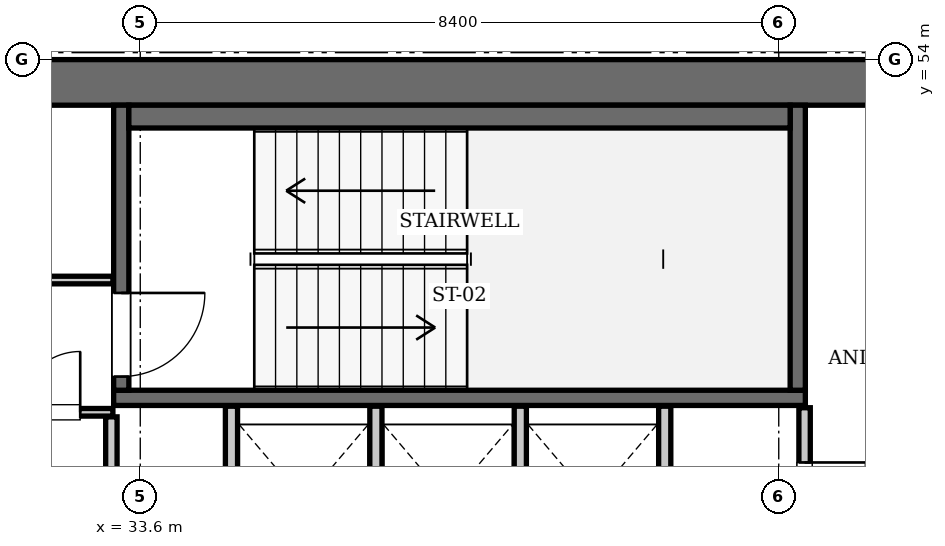
"""IFC4 building model, lengths in metres.
Left out: names, types, materials, properties, quantities, classifications, styles, units other than length and angle.
Written with IfcOpenShell. Run it as: python <this file> out.ifc"""

import sys

from ifc_helpers import new_model, si_unit, direction, frame, frame_2d, origin, place, context, subcontext, project, spatial, rectangle, extrude, element, fill, save


model = new_model("IFC4")
c1 = context("Model", 3, precision=1e-05, world=origin(), true_north=direction((0.0, 1.0)))
c2 = subcontext(c1, "Body", "Model", "MODEL_VIEW")
j1 = project(units=[si_unit("LENGTHUNIT", "METRE"), si_unit("PLANEANGLEUNIT", "RADIAN")], contexts=[c1])
p1 = place(None, origin())
s1 = spatial("IfcSite", under=j1, at=p1, CompositionType="ELEMENT")
p2 = place(p1, origin())
s2 = spatial("IfcBuilding", under=s1, at=p2, CompositionType="ELEMENT")
p3 = place(p2, frame((0.0, 0.0, 254.8)))
s3 = spatial("IfcBuildingStorey", under=s2, at=p3, CompositionType="ELEMENT", Elevation=254.8)
p4 = place(p3, frame((25.2, 53.7, 0.0), z_axis=(0.0, 0.0, 1.0), x_axis=(1.0, 0.0, 0.0)))
e1 = element("IfcWall", 1, at=p4, inside=s3, PredefinedType="SHEAR", context=c2, shape_type="SweptSolid", body=[
    extrude(rectangle(XDim=25.2, YDim=0.6, at=frame_2d((12.6, 0.0))), origin(), (0.0, 0.0, 1.0), 3.85),
])
p5 = place(p3, frame((33.25, 49.55, 0.0), z_axis=(0.0, 0.0, 1.0), x_axis=(1.0, 0.0, 0.0)))
e2 = element("IfcWall", 2, at=p5, inside=s3, PredefinedType="SOLIDWALL", context=c2, shape_type="SweptSolid", body=[
    extrude(rectangle(XDim=9.1, YDim=0.2, at=frame_2d((4.55, 0.0))), origin(), (0.0, 0.0, 1.0), 3.61),
])
p6 = place(p3, frame((42.25, 49.65, 0.0), z_axis=(0.0, 0.0, 1.0), x_axis=(0.0, 1.0, 0.0)))
e3 = element("IfcWall", 3, at=p6, inside=s3, PredefinedType="SOLIDWALL", context=c2, shape_type="SweptSolid", body=[
    extrude(rectangle(XDim=3.75, YDim=0.2, at=frame_2d((1.875, 0.0))), origin(), (0.0, 0.0, 1.0), 3.61),
])
p7 = place(p3, frame((33.35, 49.65, 0.0), z_axis=(0.0, 0.0, 1.0), x_axis=(0.0, 1.0, 0.0)))
e4 = element("IfcWall", 4, at=p7, inside=s3, PredefinedType="SOLIDWALL", context=c2, shape_type="SweptSolid", body=[
    extrude(rectangle(XDim=3.75, YDim=0.2, at=frame_2d((1.875, 0.0))), origin(), (0.0, 0.0, 1.0), 3.61),
])
p8 = place(p7, frame((0.18, 0.0, 0.0)))
e5 = element("IfcOpeningElement", 5, at=p8, cuts=e4, PredefinedType="OPENING", context=c2, shape_type="SweptSolid", body=[
    extrude(rectangle(XDim=1.1, YDim=2.15, at=frame_2d((0.55, 1.075))), frame((0.0, 0.11, 0.0), z_axis=(0.0, -1.0, 0.0), x_axis=(1.0, 0.0, 0.0)), (0.0, 0.0, 1.0), 0.22),
])
p9 = place(p3, frame((33.45, 53.25, 0.0), z_axis=(0.0, 0.0, 1.0), x_axis=(1.0, 0.0, 0.0)))
e6 = element("IfcWall", 6, at=p9, inside=s3, PredefinedType="SOLIDWALL", context=c2, shape_type="SweptSolid", body=[
    extrude(rectangle(XDim=8.7, YDim=0.3, at=frame_2d((4.35, 0.0))), origin(), (0.0, 0.0, 1.0), 3.61),
])
for number, where, z_axis, x_axis in (
    (7, (34.8, 47.25, 0.0), (0.0, 0.0, 1.0), (0.0, 1.0, 0.0)),
    (8, (36.7, 47.25, 0.0), (0.0, 0.0, 1.0), (0.0, 1.0, 0.0)),
    (9, (38.6, 47.25, 0.0), (0.0, 0.0, 1.0), (0.0, 1.0, 0.0)),
    (10, (40.5, 47.25, 0.0), (0.0, 0.0, 1.0), (0.0, 1.0, 0.0)),
):
    element("IfcWall", number, at=place(p3, frame(where, z_axis=z_axis, x_axis=x_axis)), inside=s3, PredefinedType="SOLIDWALL", context=c2, shape_type="SweptSolid", body=[
        extrude(rectangle(XDim=2.19, YDim=0.16, at=frame_2d((1.095, 0.0))), origin(), (0.0, 0.0, 1.0), 3.61),
    ])
p10 = place(p3, frame((33.22, 45.14, 0.0), z_axis=(0.0, 0.0, 1.0), x_axis=(0.0, 1.0, 0.0)))
e11 = element("IfcWall", 11, at=p10, inside=s3, PredefinedType="PARTITIONING", context=c2, shape_type="SweptSolid", body=[
    extrude(rectangle(XDim=4.16, YDim=0.15, at=frame_2d((2.08, 0.0))), origin(), (0.0, 0.0, 1.0), 3.61),
])
p11 = place(p3, frame((30.06, 49.36, 0.0), z_axis=(0.0, 0.0, 1.0), x_axis=(1.0, 0.0, 0.0)))
e12 = element("IfcWall", 12, at=p11, inside=s3, PredefinedType="PARTITIONING", context=c2, shape_type="SweptSolid", body=[
    extrude(rectangle(XDim=3.18, YDim=0.1, at=frame_2d((1.59, 0.0))), origin(), (0.0, 0.0, 1.0), 3.61),
])
p12 = place(p11, frame((1.95, 0.0, 0.0)))
e13 = element("IfcOpeningElement", 13, at=p12, cuts=e12, PredefinedType="OPENING", context=c2, shape_type="SweptSolid", body=[
    extrude(rectangle(XDim=0.8, YDim=2.05, at=frame_2d((0.4, 1.025))), frame((0.0, 0.06, 0.0), z_axis=(0.0, -1.0, 0.0), x_axis=(1.0, 0.0, 0.0)), (0.0, 0.0, 1.0), 0.12),
])
p13 = place(p3, frame((31.82, 51.1, 0.0), z_axis=(0.0, 0.0, 1.0), x_axis=(1.0, 0.0, 0.0)))
e14 = element("IfcWall", 14, at=p13, inside=s3, PredefinedType="PARTITIONING", context=c2, shape_type="SweptSolid", body=[
    extrude(rectangle(XDim=1.42, YDim=0.1, at=frame_2d((0.71, 0.0))), origin(), (0.0, 0.0, 1.0), 3.61),
])
p14 = place(p3, frame((42.34, 47.66, 0.0), z_axis=(0.0, 0.0, 1.0), x_axis=(0.0, 1.0, 0.0)))
e15 = element("IfcWall", 15, at=p14, inside=s3, PredefinedType="PARTITIONING", context=c2, shape_type="SweptSolid", body=[
    extrude(rectangle(XDim=1.76, YDim=0.15, at=frame_2d((0.88, 0.0))), origin(), (0.0, 0.0, 1.0), 3.61),
])
p15 = place(p14, frame((0.24, 0.0, 0.0)))
e16 = element("IfcOpeningElement", 16, at=p15, cuts=e15, PredefinedType="OPENING", context=c2, shape_type="SweptSolid", body=[
    extrude(rectangle(XDim=0.8, YDim=2.05, at=frame_2d((0.4, 1.025))), frame((0.0, 0.085, 0.0), z_axis=(0.0, -1.0, 0.0), x_axis=(1.0, 0.0, 0.0)), (0.0, 0.0, 1.0), 0.17),
])
p16 = place(p8, frame((1.1, 0.0, 0.0), z_axis=(0.0, 0.0, 1.0), x_axis=(-1.0, 0.0, 0.0)))
e17 = element("IfcDoor", 17, at=p16, inside=s3, OperationType="SINGLE_SWING_LEFT", PredefinedType="DOOR", context=c2, shape_type="SweptSolid", body=[
    extrude(rectangle(XDim=1.1, YDim=2.15, at=frame_2d((0.55, 1.075))), frame((0.0, 0.025, 0.0), z_axis=(0.0, -1.0, 0.0), x_axis=(1.0, 0.0, 0.0)), (0.0, 0.0, 1.0), 0.05),
])
fill(e5, e17)
p17 = place(p12, origin())
e18 = element("IfcDoor", 18, at=p17, inside=s3, OperationType="SINGLE_SWING_RIGHT", PredefinedType="DOOR", context=c2, shape_type="SweptSolid", body=[
    extrude(rectangle(XDim=0.8, YDim=2.05, at=frame_2d((0.4, 1.025))), frame((0.0, 0.025, 0.0), z_axis=(0.0, -1.0, 0.0), x_axis=(1.0, 0.0, 0.0)), (0.0, 0.0, 1.0), 0.05),
])
fill(e13, e18)
p18 = place(p15, frame((0.8, 0.0, 0.0), z_axis=(0.0, 0.0, 1.0), x_axis=(-1.0, 0.0, 0.0)))
e19 = element("IfcDoor", 19, at=p18, inside=s3, OperationType="SINGLE_SWING_LEFT", PredefinedType="DOOR", context=c2, shape_type="SweptSolid", body=[
    extrude(rectangle(XDim=0.8, YDim=2.05, at=frame_2d((0.4, 1.025))), frame((0.0, 0.025, 0.0), z_axis=(0.0, -1.0, 0.0), x_axis=(1.0, 0.0, 0.0)), (0.0, 0.0, 1.0), 0.05),
])
fill(e16, e19)
save(model, sys.argv[1])
